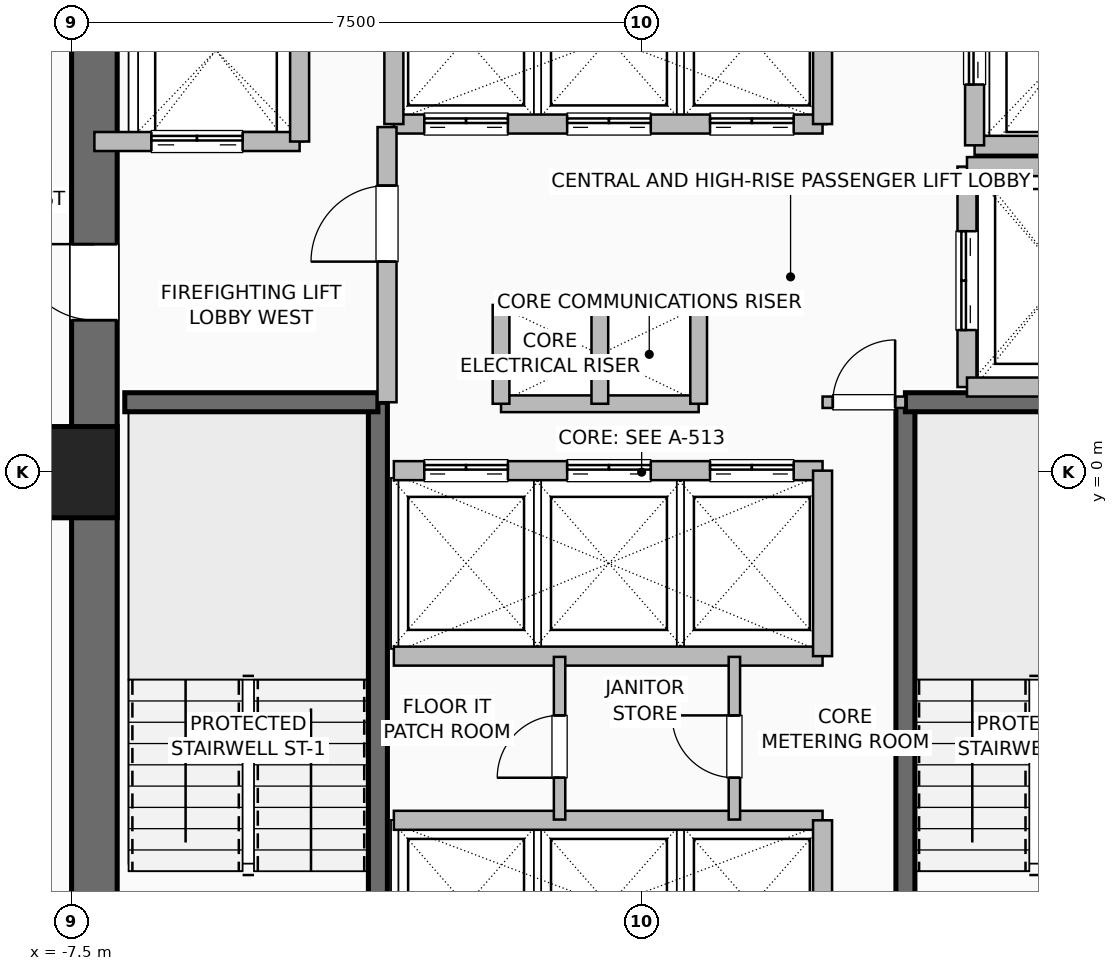
"""IFC4 building model, lengths in metres.
Left out: names, types, materials, properties, quantities, classifications, styles, units other than length and angle.
Written with IfcOpenShell. Run it as: python <this file> out.ifc"""

import sys

from ifc_helpers import new_model, si_unit, direction, frame, frame_2d, origin, origin_2d, place, context, subcontext, project, spatial, rectangle, hollow_rectangle, extrude, element, fill, save


model = new_model("IFC4")
c1 = context("Model", 3, precision=1e-05, world=origin(), true_north=direction((0.0, 1.0)))
c2 = subcontext(c1, "Body", "Model", "MODEL_VIEW")
j1 = project(units=[si_unit("LENGTHUNIT", "METRE"), si_unit("PLANEANGLEUNIT", "RADIAN")], contexts=[c1])
p1 = place(None, origin())
s1 = spatial("IfcSite", under=j1, at=p1, CompositionType="ELEMENT")
p2 = place(p1, origin())
s2 = spatial("IfcBuilding", under=s1, at=p2, CompositionType="ELEMENT")
p3 = place(p2, frame((0.0, 0.0, 48.0)))
s3 = spatial("IfcBuildingStorey", under=s2, at=p3, CompositionType="ELEMENT", Elevation=48.0)
p4 = place(p3, frame((-7.5, 0.0, 0.0), z_axis=(0.0, 0.0, 1.0), x_axis=(1.0, 0.0, 0.0)))
e1 = element("IfcColumn", 1, at=p4, inside=s3, PredefinedType="COLUMN", context=c2, shape_type="SweptSolid", body=[
    extrude(hollow_rectangle(XDim=1.2, YDim=1.2, WallThickness=0.055, at=origin_2d()), origin(), (0.0, 0.0, 1.0), 3.5),
])
p5 = place(p3, frame((-7.2, -7.5, 0.0), z_axis=(0.0, 0.0, 1.0), x_axis=(0.0, 1.0, 0.0)))
e2 = element("IfcWall", 2, at=p5, inside=s3, PredefinedType="SHEAR", context=c2, shape_type="SweptSolid", body=[
    extrude(rectangle(XDim=15.0, YDim=0.6, at=frame_2d((7.5, 0.0))), origin(), (0.0, 0.0, 1.0), 3.25),
])
p6 = place(p5, frame((9.5, 0.0, 0.0)))
e3 = element("IfcOpeningElement", 3, at=p6, cuts=e2, PredefinedType="OPENING", context=c2, shape_type="SweptSolid", body=[
    extrude(rectangle(XDim=1.0, YDim=2.08, at=frame_2d((0.5, 1.04))), frame((0.0, 0.31, 0.0), z_axis=(0.0, -1.0, 0.0), x_axis=(1.0, 0.0, 0.0)), (0.0, 0.0, 1.0), 0.62),
])
p7 = place(p3, frame((-3.47, -6.8, 0.0), z_axis=(0.0, 0.0, 1.0), x_axis=(0.0, 1.0, 0.0)))
e4 = element("IfcWall", 4, at=p7, inside=s3, PredefinedType="SHEAR", context=c2, shape_type="SweptSolid", body=[
    extrude(rectangle(XDim=7.72, YDim=0.25, at=frame_2d((3.86, 0.0))), origin(), (0.0, 0.0, 1.0), 3.25),
])
p8 = place(p3, frame((-6.8, 0.92, 0.0), z_axis=(0.0, 0.0, 1.0), x_axis=(1.0, 0.0, 0.0)))
e5 = element("IfcWall", 5, at=p8, inside=s3, PredefinedType="SHEAR", context=c2, shape_type="SweptSolid", body=[
    extrude(rectangle(XDim=3.33, YDim=0.25, at=frame_2d((1.665, 0.0))), origin(), (0.0, 0.0, 1.0), 3.25),
])
p9 = place(p3, frame((3.47, -6.8, 0.0), z_axis=(0.0, 0.0, 1.0), x_axis=(0.0, 1.0, 0.0)))
e6 = element("IfcWall", 6, at=p9, inside=s3, PredefinedType="SHEAR", context=c2, shape_type="SweptSolid", body=[
    extrude(rectangle(XDim=7.72, YDim=0.25, at=frame_2d((3.86, 0.0))), origin(), (0.0, 0.0, 1.0), 3.25),
])
p10 = place(p3, frame((3.47, 0.92, 0.0), z_axis=(0.0, 0.0, 1.0), x_axis=(1.0, 0.0, 0.0)))
e7 = element("IfcWall", 7, at=p10, inside=s3, PredefinedType="SHEAR", context=c2, shape_type="SweptSolid", body=[
    extrude(rectangle(XDim=3.33, YDim=0.25, at=frame_2d((1.665, 0.0))), origin(), (0.0, 0.0, 1.0), 3.25),
])
for number, where, z_axis, x_axis in (
    (8, (-1.85, 2.2, 0.0), (0.0, 0.0, 1.0), (1.0, 0.0, 0.0)),
    (9, (-1.85, 0.9, 0.0), (0.0, 0.0, 1.0), (1.0, 0.0, 0.0)),
):
    element("IfcWall", number, at=place(p3, frame(where, z_axis=z_axis, x_axis=x_axis)), inside=s3, PredefinedType="PARTITIONING", context=c2, shape_type="SweptSolid", body=[
        extrude(rectangle(XDim=2.6, YDim=0.22, at=frame_2d((1.3, 0.0))), origin(), (0.0, 0.0, 1.0), 3.25),
    ])
for number, where, z_axis, x_axis in (
    (10, (-0.55, 0.9, 0.0), (0.0, 0.0, 1.0), (0.0, 1.0, 0.0)),
    (11, (0.75, 0.9, 0.0), (0.0, 0.0, 1.0), (0.0, 1.0, 0.0)),
    (12, (-1.85, 0.9, 0.0), (0.0, 0.0, 1.0), (0.0, 1.0, 0.0)),
):
    element("IfcWall", number, at=place(p3, frame(where, z_axis=z_axis, x_axis=x_axis)), inside=s3, PredefinedType="PARTITIONING", context=c2, shape_type="SweptSolid", body=[
        extrude(rectangle(XDim=1.3, YDim=0.22, at=frame_2d((0.65, 0.0))), origin(), (0.0, 0.0, 1.0), 3.25),
    ])
p11 = place(p3, frame((-3.26, -4.58, 0.0), z_axis=(0.0, 0.0, 1.0), x_axis=(1.0, 0.0, 0.0)))
e13 = element("IfcWall", 13, at=p11, inside=s3, PredefinedType="SHEAR", context=c2, shape_type="SweptSolid", body=[
    extrude(rectangle(XDim=5.64, YDim=0.25, at=frame_2d((2.82, 0.0))), origin(), (0.0, 0.0, 1.0), 3.25),
])
p12 = place(p3, frame((2.38, -6.8, 0.0), z_axis=(0.0, 0.0, 1.0), x_axis=(0.0, 1.0, 0.0)))
e14 = element("IfcWall", 14, at=p12, inside=s3, PredefinedType="SHEAR", context=c2, shape_type="SweptSolid", body=[
    extrude(rectangle(XDim=2.22, YDim=0.25, at=frame_2d((1.11, 0.0))), origin(), (0.0, 0.0, 1.0), 3.25),
])
p13 = place(p3, frame((-3.26, 0.02, 0.0), z_axis=(0.0, 0.0, 1.0), x_axis=(1.0, 0.0, 0.0)))
e15 = element("IfcWall", 15, at=p13, inside=s3, PredefinedType="SHEAR", context=c2, shape_type="SweptSolid", body=[
    extrude(rectangle(XDim=5.64, YDim=0.25, at=frame_2d((2.82, 0.0))), origin(), (0.0, 0.0, 1.0), 3.25),
])
p14 = place(p13, frame((0.4, 0.0, 0.0)))
e16 = element("IfcOpeningElement", 16, at=p14, cuts=e15, PredefinedType="OPENING", context=c2, shape_type="SweptSolid", body=[
    extrude(rectangle(XDim=1.1, YDim=2.2, at=frame_2d((0.55, 1.1))), frame((0.0, 0.135, 0.0), z_axis=(0.0, -1.0, 0.0), x_axis=(1.0, 0.0, 0.0)), (0.0, 0.0, 1.0), 0.27),
])
p15 = place(p13, frame((2.28, 0.0, 0.0)))
e17 = element("IfcOpeningElement", 17, at=p15, cuts=e15, PredefinedType="OPENING", context=c2, shape_type="SweptSolid", body=[
    extrude(rectangle(XDim=1.1, YDim=2.2, at=frame_2d((0.55, 1.1))), frame((0.0, 0.135, 0.0), z_axis=(0.0, -1.0, 0.0), x_axis=(1.0, 0.0, 0.0)), (0.0, 0.0, 1.0), 0.27),
])
p16 = place(p13, frame((4.16, 0.0, 0.0)))
e18 = element("IfcOpeningElement", 18, at=p16, cuts=e15, PredefinedType="OPENING", context=c2, shape_type="SweptSolid", body=[
    extrude(rectangle(XDim=1.1, YDim=2.2, at=frame_2d((0.55, 1.1))), frame((0.0, 0.135, 0.0), z_axis=(0.0, -1.0, 0.0), x_axis=(1.0, 0.0, 0.0)), (0.0, 0.0, 1.0), 0.27),
])
p17 = place(p3, frame((-3.26, -2.42, 0.0), z_axis=(0.0, 0.0, 1.0), x_axis=(1.0, 0.0, 0.0)))
e19 = element("IfcWall", 19, at=p17, inside=s3, PredefinedType="SHEAR", context=c2, shape_type="SweptSolid", body=[
    extrude(rectangle(XDim=5.64, YDim=0.25, at=frame_2d((2.82, 0.0))), origin(), (0.0, 0.0, 1.0), 3.25),
])
p18 = place(p3, frame((2.38, -2.42, 0.0), z_axis=(0.0, 0.0, 1.0), x_axis=(0.0, 1.0, 0.0)))
e20 = element("IfcWall", 20, at=p18, inside=s3, PredefinedType="SHEAR", context=c2, shape_type="SweptSolid", body=[
    extrude(rectangle(XDim=2.44, YDim=0.25, at=frame_2d((1.22, 0.0))), origin(), (0.0, 0.0, 1.0), 3.25),
])
p19 = place(p3, frame((-3.26, 4.58, 0.0), z_axis=(0.0, 0.0, 1.0), x_axis=(1.0, 0.0, 0.0)))
e21 = element("IfcWall", 21, at=p19, inside=s3, PredefinedType="SHEAR", context=c2, shape_type="SweptSolid", body=[
    extrude(rectangle(XDim=5.64, YDim=0.25, at=frame_2d((2.82, 0.0))), origin(), (0.0, 0.0, 1.0), 3.25),
])
p20 = place(p19, frame((0.4, 0.0, 0.0)))
e22 = element("IfcOpeningElement", 22, at=p20, cuts=e21, PredefinedType="OPENING", context=c2, shape_type="SweptSolid", body=[
    extrude(rectangle(XDim=1.1, YDim=2.2, at=frame_2d((0.55, 1.1))), frame((0.0, 0.135, 0.0), z_axis=(0.0, -1.0, 0.0), x_axis=(1.0, 0.0, 0.0)), (0.0, 0.0, 1.0), 0.27),
])
p21 = place(p19, frame((2.28, 0.0, 0.0)))
e23 = element("IfcOpeningElement", 23, at=p21, cuts=e21, PredefinedType="OPENING", context=c2, shape_type="SweptSolid", body=[
    extrude(rectangle(XDim=1.1, YDim=2.2, at=frame_2d((0.55, 1.1))), frame((0.0, 0.135, 0.0), z_axis=(0.0, -1.0, 0.0), x_axis=(1.0, 0.0, 0.0)), (0.0, 0.0, 1.0), 0.27),
])
p22 = place(p19, frame((4.16, 0.0, 0.0)))
e24 = element("IfcOpeningElement", 24, at=p22, cuts=e21, PredefinedType="OPENING", context=c2, shape_type="SweptSolid", body=[
    extrude(rectangle(XDim=1.1, YDim=2.2, at=frame_2d((0.55, 1.1))), frame((0.0, 0.135, 0.0), z_axis=(0.0, -1.0, 0.0), x_axis=(1.0, 0.0, 0.0)), (0.0, 0.0, 1.0), 0.27),
])
for number, where, z_axis, x_axis in (
    (25, (-3.26, 4.58, 0.0), (0.0, 0.0, 1.0), (0.0, 1.0, 0.0)),
    (26, (2.38, 4.58, 0.0), (0.0, 0.0, 1.0), (0.0, 1.0, 0.0)),
):
    element("IfcWall", number, at=place(p3, frame(where, z_axis=z_axis, x_axis=x_axis)), inside=s3, PredefinedType="SHEAR", context=c2, shape_type="SweptSolid", body=[
        extrude(rectangle(XDim=2.22, YDim=0.25, at=frame_2d((1.11, 0.0))), origin(), (0.0, 0.0, 1.0), 3.25),
    ])
p23 = place(p3, frame((-7.2, 4.35, 0.0), z_axis=(0.0, 0.0, 1.0), x_axis=(1.0, 0.0, 0.0)))
e27 = element("IfcWall", 27, at=p23, inside=s3, PredefinedType="SHEAR", context=c2, shape_type="SweptSolid", body=[
    extrude(rectangle(XDim=2.7, YDim=0.25, at=frame_2d((1.35, 0.0))), origin(), (0.0, 0.0, 1.0), 3.25),
])
p24 = place(p23, frame((0.75, 0.0, 0.0)))
e28 = element("IfcOpeningElement", 28, at=p24, cuts=e27, PredefinedType="OPENING", context=c2, shape_type="SweptSolid", body=[
    extrude(rectangle(XDim=1.2, YDim=2.2, at=frame_2d((0.6, 1.1))), frame((0.0, 0.135, 0.0), z_axis=(0.0, -1.0, 0.0), x_axis=(1.0, 0.0, 0.0)), (0.0, 0.0, 1.0), 0.27),
])
p25 = place(p3, frame((-4.5, 4.35, 0.0), z_axis=(0.0, 0.0, 1.0), x_axis=(0.0, 1.0, 0.0)))
e29 = element("IfcWall", 29, at=p25, inside=s3, PredefinedType="SHEAR", context=c2, shape_type="SweptSolid", body=[
    extrude(rectangle(XDim=2.85, YDim=0.25, at=frame_2d((1.425, 0.0))), origin(), (0.0, 0.0, 1.0), 3.25),
])
p26 = place(p3, frame((4.38, 4.3, 0.0), z_axis=(0.0, 0.0, 1.0), x_axis=(1.0, 0.0, 0.0)))
e30 = element("IfcWall", 30, at=p26, inside=s3, PredefinedType="SHEAR", context=c2, shape_type="SweptSolid", body=[
    extrude(rectangle(XDim=2.42, YDim=0.25, at=frame_2d((1.21, 0.0))), origin(), (0.0, 0.0, 1.0), 3.25),
])
p27 = place(p3, frame((4.38, 4.3, 0.0), z_axis=(0.0, 0.0, 1.0), x_axis=(0.0, 1.0, 0.0)))
e31 = element("IfcWall", 31, at=p27, inside=s3, PredefinedType="SHEAR", context=c2, shape_type="SweptSolid", body=[
    extrude(rectangle(XDim=2.5, YDim=0.25, at=frame_2d((1.25, 0.0))), origin(), (0.0, 0.0, 1.0), 3.25),
])
p28 = place(p27, frame((0.8, 0.0, 0.0)))
e32 = element("IfcOpeningElement", 32, at=p28, cuts=e31, PredefinedType="OPENING", context=c2, shape_type="SweptSolid", body=[
    extrude(rectangle(XDim=1.2, YDim=2.2, at=frame_2d((0.6, 1.1))), frame((0.0, 0.135, 0.0), z_axis=(0.0, -1.0, 0.0), x_axis=(1.0, 0.0, 0.0)), (0.0, 0.0, 1.0), 0.27),
])
p29 = place(p3, frame((4.28, 1.12, 0.0), z_axis=(0.0, 0.0, 1.0), x_axis=(0.0, 1.0, 0.0)))
e33 = element("IfcWall", 33, at=p29, inside=s3, PredefinedType="SHEAR", context=c2, shape_type="SweptSolid", body=[
    extrude(rectangle(XDim=2.9, YDim=0.25, at=frame_2d((1.45, 0.0))), origin(), (0.0, 0.0, 1.0), 3.25),
])
p30 = place(p29, frame((0.75, 0.0, 0.0)))
e34 = element("IfcOpeningElement", 34, at=p30, cuts=e33, PredefinedType="OPENING", context=c2, shape_type="SweptSolid", body=[
    extrude(rectangle(XDim=1.3, YDim=2.3, at=frame_2d((0.65, 1.15))), frame((0.0, 0.135, 0.0), z_axis=(0.0, -1.0, 0.0), x_axis=(1.0, 0.0, 0.0)), (0.0, 0.0, 1.0), 0.27),
])
for number, where, z_axis, x_axis in (
    (35, (4.28, 1.12, 0.0), (0.0, 0.0, 1.0), (1.0, 0.0, 0.0)),
    (36, (4.28, 4.02, 0.0), (0.0, 0.0, 1.0), (1.0, 0.0, 0.0)),
):
    element("IfcWall", number, at=place(p3, frame(where, z_axis=z_axis, x_axis=x_axis)), inside=s3, PredefinedType="SHEAR", context=c2, shape_type="SweptSolid", body=[
        extrude(rectangle(XDim=2.52, YDim=0.25, at=frame_2d((1.26, 0.0))), origin(), (0.0, 0.0, 1.0), 3.25),
    ])
p31 = place(p3, frame((-3.35, 0.92, 0.0), z_axis=(0.0, 0.0, 1.0), x_axis=(0.0, 1.0, 0.0)))
e37 = element("IfcWall", 37, at=p31, inside=s3, PredefinedType="SHEAR", context=c2, shape_type="SweptSolid", body=[
    extrude(rectangle(XDim=3.62, YDim=0.25, at=frame_2d((1.81, 0.0))), origin(), (0.0, 0.0, 1.0), 3.25),
])
p32 = place(p31, frame((1.85, 0.0, 0.0)))
e38 = element("IfcOpeningElement", 38, at=p32, cuts=e37, PredefinedType="OPENING", context=c2, shape_type="SweptSolid", body=[
    extrude(rectangle(XDim=1.0, YDim=2.08, at=frame_2d((0.5, 1.04))), frame((0.0, 0.135, 0.0), z_axis=(0.0, -1.0, 0.0), x_axis=(1.0, 0.0, 0.0)), (0.0, 0.0, 1.0), 0.27),
])
p33 = place(p3, frame((2.38, 0.92, 0.0), z_axis=(0.0, 0.0, 1.0), x_axis=(1.0, 0.0, 0.0)))
e39 = element("IfcWall", 39, at=p33, inside=s3, PredefinedType="PARTITIONING", context=c2, shape_type="SweptSolid", body=[
    extrude(rectangle(XDim=1.09, YDim=0.15, at=frame_2d((0.545, 0.0))), origin(), (0.0, 0.0, 1.0), 3.25),
])
p34 = place(p33, frame((0.135, 0.0, 0.0)))
e40 = element("IfcOpeningElement", 40, at=p34, cuts=e39, PredefinedType="OPENING", context=c2, shape_type="SweptSolid", body=[
    extrude(rectangle(XDim=0.82, YDim=2.05, at=frame_2d((0.41, 1.025))), frame((0.0, 0.085, 0.0), z_axis=(0.0, -1.0, 0.0), x_axis=(1.0, 0.0, 0.0)), (0.0, 0.0, 1.0), 0.17),
])
p35 = place(p3, frame((-1.08, -4.57, 0.0), z_axis=(0.0, 0.0, 1.0), x_axis=(0.0, 1.0, 0.0)))
e41 = element("IfcWall", 41, at=p35, inside=s3, PredefinedType="PARTITIONING", context=c2, shape_type="SweptSolid", body=[
    extrude(rectangle(XDim=2.14, YDim=0.15, at=frame_2d((1.07, 0.0))), origin(), (0.0, 0.0, 1.0), 3.25),
])
p36 = place(p35, frame((0.55, 0.0, 0.0)))
e42 = element("IfcOpeningElement", 42, at=p36, cuts=e41, PredefinedType="OPENING", context=c2, shape_type="SweptSolid", body=[
    extrude(rectangle(XDim=0.82, YDim=2.05, at=frame_2d((0.41, 1.025))), frame((0.0, 0.085, 0.0), z_axis=(0.0, -1.0, 0.0), x_axis=(1.0, 0.0, 0.0)), (0.0, 0.0, 1.0), 0.17),
])
p37 = place(p3, frame((1.22, -4.57, 0.0), z_axis=(0.0, 0.0, 1.0), x_axis=(0.0, 1.0, 0.0)))
e43 = element("IfcWall", 43, at=p37, inside=s3, PredefinedType="PARTITIONING", context=c2, shape_type="SweptSolid", body=[
    extrude(rectangle(XDim=2.14, YDim=0.15, at=frame_2d((1.07, 0.0))), origin(), (0.0, 0.0, 1.0), 3.25),
])
p38 = place(p37, frame((0.55, 0.0, 0.0)))
e44 = element("IfcOpeningElement", 44, at=p38, cuts=e43, PredefinedType="OPENING", context=c2, shape_type="SweptSolid", body=[
    extrude(rectangle(XDim=0.82, YDim=2.05, at=frame_2d((0.41, 1.025))), frame((0.0, 0.085, 0.0), z_axis=(0.0, -1.0, 0.0), x_axis=(1.0, 0.0, 0.0)), (0.0, 0.0, 1.0), 0.17),
])
p39 = place(p6, origin())
e45 = element("IfcDoor", 45, at=p39, inside=s3, OperationType="SINGLE_SWING_RIGHT", PredefinedType="DOOR", context=c2, shape_type="SweptSolid", body=[
    extrude(rectangle(XDim=1.0, YDim=2.08, at=frame_2d((0.5, 1.04))), frame((0.0, 0.025, 0.0), z_axis=(0.0, -1.0, 0.0), x_axis=(1.0, 0.0, 0.0)), (0.0, 0.0, 1.0), 0.05),
])
fill(e3, e45)
p40 = place(p14, origin())
e46 = element("IfcDoor", 46, at=p40, inside=s3, OperationType="DOUBLE_DOOR_SLIDING", PredefinedType="DOOR", context=c2, shape_type="SweptSolid", body=[
    extrude(rectangle(XDim=1.1, YDim=2.2, at=frame_2d((0.55, 1.1))), frame((0.0, 0.025, 0.0), z_axis=(0.0, -1.0, 0.0), x_axis=(1.0, 0.0, 0.0)), (0.0, 0.0, 1.0), 0.05),
])
fill(e16, e46)
p41 = place(p15, origin())
e47 = element("IfcDoor", 47, at=p41, inside=s3, OperationType="DOUBLE_DOOR_SLIDING", PredefinedType="DOOR", context=c2, shape_type="SweptSolid", body=[
    extrude(rectangle(XDim=1.1, YDim=2.2, at=frame_2d((0.55, 1.1))), frame((0.0, 0.025, 0.0), z_axis=(0.0, -1.0, 0.0), x_axis=(1.0, 0.0, 0.0)), (0.0, 0.0, 1.0), 0.05),
])
fill(e17, e47)
p42 = place(p16, origin())
e48 = element("IfcDoor", 48, at=p42, inside=s3, OperationType="DOUBLE_DOOR_SLIDING", PredefinedType="DOOR", context=c2, shape_type="SweptSolid", body=[
    extrude(rectangle(XDim=1.1, YDim=2.2, at=frame_2d((0.55, 1.1))), frame((0.0, 0.025, 0.0), z_axis=(0.0, -1.0, 0.0), x_axis=(1.0, 0.0, 0.0)), (0.0, 0.0, 1.0), 0.05),
])
fill(e18, e48)
p43 = place(p20, origin())
e49 = element("IfcDoor", 49, at=p43, inside=s3, OperationType="DOUBLE_DOOR_SLIDING", PredefinedType="DOOR", context=c2, shape_type="SweptSolid", body=[
    extrude(rectangle(XDim=1.1, YDim=2.2, at=frame_2d((0.55, 1.1))), frame((0.0, 0.025, 0.0), z_axis=(0.0, -1.0, 0.0), x_axis=(1.0, 0.0, 0.0)), (0.0, 0.0, 1.0), 0.05),
])
fill(e22, e49)
p44 = place(p21, origin())
e50 = element("IfcDoor", 50, at=p44, inside=s3, OperationType="DOUBLE_DOOR_SLIDING", PredefinedType="DOOR", context=c2, shape_type="SweptSolid", body=[
    extrude(rectangle(XDim=1.1, YDim=2.2, at=frame_2d((0.55, 1.1))), frame((0.0, 0.025, 0.0), z_axis=(0.0, -1.0, 0.0), x_axis=(1.0, 0.0, 0.0)), (0.0, 0.0, 1.0), 0.05),
])
fill(e23, e50)
p45 = place(p22, origin())
e51 = element("IfcDoor", 51, at=p45, inside=s3, OperationType="DOUBLE_DOOR_SLIDING", PredefinedType="DOOR", context=c2, shape_type="SweptSolid", body=[
    extrude(rectangle(XDim=1.1, YDim=2.2, at=frame_2d((0.55, 1.1))), frame((0.0, 0.025, 0.0), z_axis=(0.0, -1.0, 0.0), x_axis=(1.0, 0.0, 0.0)), (0.0, 0.0, 1.0), 0.05),
])
fill(e24, e51)
p46 = place(p24, origin())
e52 = element("IfcDoor", 52, at=p46, inside=s3, OperationType="DOUBLE_DOOR_SLIDING", PredefinedType="DOOR", context=c2, shape_type="SweptSolid", body=[
    extrude(rectangle(XDim=1.2, YDim=2.2, at=frame_2d((0.6, 1.1))), frame((0.0, 0.025, 0.0), z_axis=(0.0, -1.0, 0.0), x_axis=(1.0, 0.0, 0.0)), (0.0, 0.0, 1.0), 0.05),
])
fill(e28, e52)
p47 = place(p28, origin())
e53 = element("IfcDoor", 53, at=p47, inside=s3, OperationType="DOUBLE_DOOR_SLIDING", PredefinedType="DOOR", context=c2, shape_type="SweptSolid", body=[
    extrude(rectangle(XDim=1.2, YDim=2.2, at=frame_2d((0.6, 1.1))), frame((0.0, 0.025, 0.0), z_axis=(0.0, -1.0, 0.0), x_axis=(1.0, 0.0, 0.0)), (0.0, 0.0, 1.0), 0.05),
])
fill(e32, e53)
p48 = place(p30, origin())
e54 = element("IfcDoor", 54, at=p48, inside=s3, OperationType="DOUBLE_DOOR_SLIDING", PredefinedType="DOOR", context=c2, shape_type="SweptSolid", body=[
    extrude(rectangle(XDim=1.3, YDim=2.3, at=frame_2d((0.65, 1.15))), frame((0.0, 0.025, 0.0), z_axis=(0.0, -1.0, 0.0), x_axis=(1.0, 0.0, 0.0)), (0.0, 0.0, 1.0), 0.05),
])
fill(e34, e54)
p49 = place(p32, origin())
e55 = element("IfcDoor", 55, at=p49, inside=s3, OperationType="SINGLE_SWING_LEFT", PredefinedType="DOOR", context=c2, shape_type="SweptSolid", body=[
    extrude(rectangle(XDim=1.0, YDim=2.08, at=frame_2d((0.5, 1.04))), frame((0.0, 0.025, 0.0), z_axis=(0.0, -1.0, 0.0), x_axis=(1.0, 0.0, 0.0)), (0.0, 0.0, 1.0), 0.05),
])
fill(e38, e55)
p50 = place(p34, origin())
e56 = element("IfcDoor", 56, at=p50, inside=s3, OperationType="SINGLE_SWING_RIGHT", PredefinedType="DOOR", context=c2, shape_type="SweptSolid", body=[
    extrude(rectangle(XDim=0.82, YDim=2.05, at=frame_2d((0.41, 1.025))), frame((0.0, 0.025, 0.0), z_axis=(0.0, -1.0, 0.0), x_axis=(1.0, 0.0, 0.0)), (0.0, 0.0, 1.0), 0.05),
])
fill(e40, e56)
p51 = place(p36, origin())
e57 = element("IfcDoor", 57, at=p51, inside=s3, OperationType="SINGLE_SWING_LEFT", PredefinedType="DOOR", context=c2, shape_type="SweptSolid", body=[
    extrude(rectangle(XDim=0.82, YDim=2.05, at=frame_2d((0.41, 1.025))), frame((0.0, 0.025, 0.0), z_axis=(0.0, -1.0, 0.0), x_axis=(1.0, 0.0, 0.0)), (0.0, 0.0, 1.0), 0.05),
])
fill(e42, e57)
p52 = place(p38, origin())
e58 = element("IfcDoor", 58, at=p52, inside=s3, OperationType="SINGLE_SWING_RIGHT", PredefinedType="DOOR", context=c2, shape_type="SweptSolid", body=[
    extrude(rectangle(XDim=0.82, YDim=2.05, at=frame_2d((0.41, 1.025))), frame((0.0, 0.025, 0.0), z_axis=(0.0, -1.0, 0.0), x_axis=(1.0, 0.0, 0.0)), (0.0, 0.0, 1.0), 0.05),
])
fill(e44, e58)
save(model, sys.argv[1])
